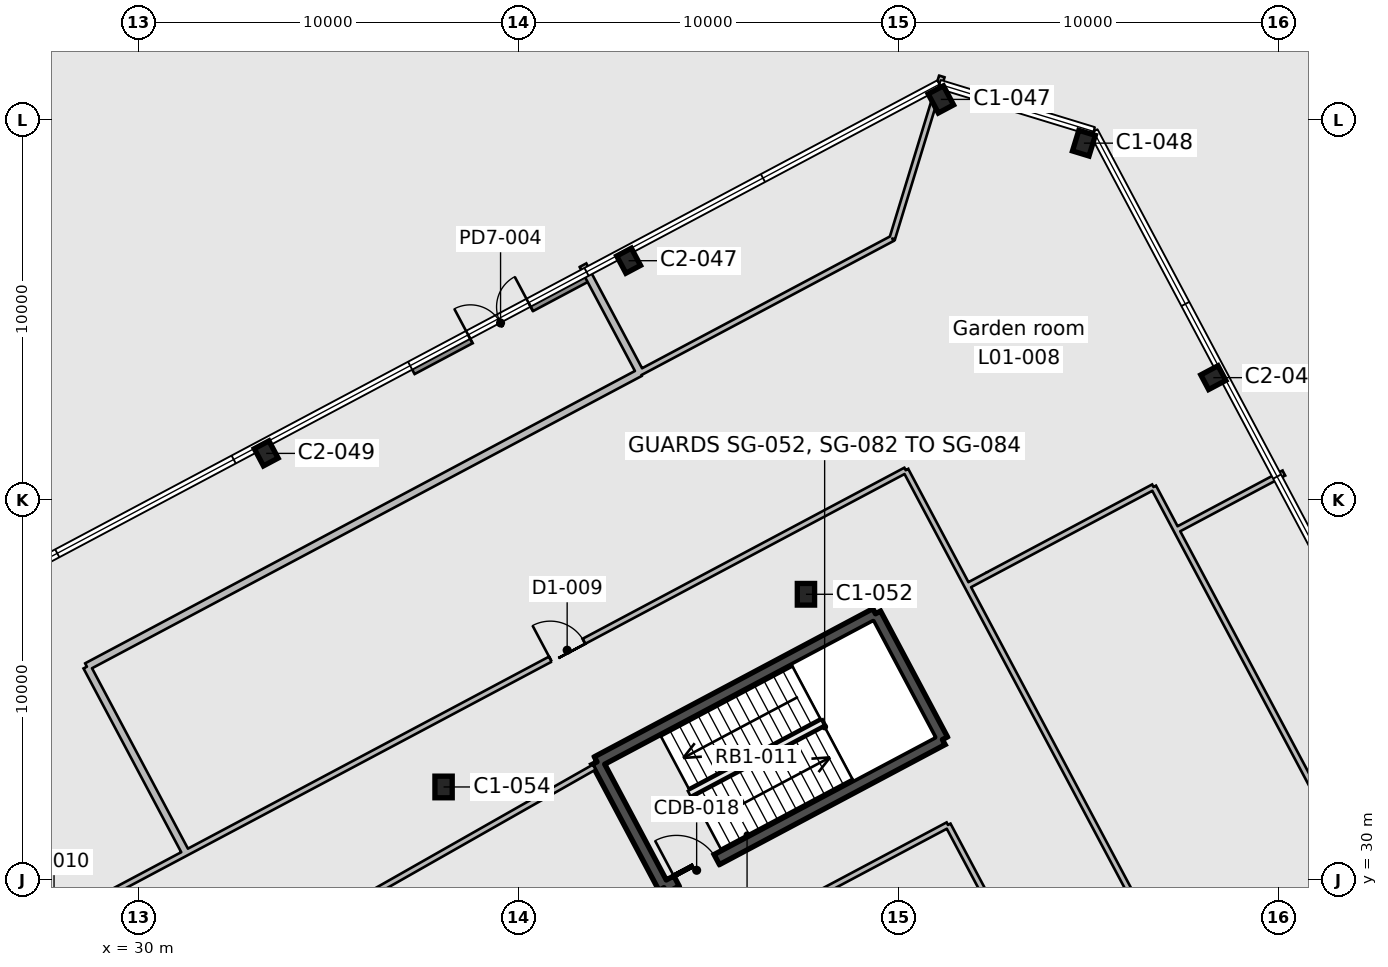
"""IFC4 building model, lengths in metres.
Left out: names, types, materials, properties, quantities, classifications, styles, units other than length and angle.
Written with IfcOpenShell. Run it as: python <this file> out.ifc"""

import sys

from ifc_helpers import new_model, si_unit, direction, frame, frame_2d, origin, origin_2d, place, context, subcontext, project, spatial, rectangle, i_section, extrude, element, fill, save


model = new_model("IFC4")
c1 = context("Model", 3, precision=1e-05, world=origin(), true_north=direction((0.0, 1.0)))
c2 = subcontext(c1, "Body", "Model", "MODEL_VIEW")
j1 = project(units=[si_unit("LENGTHUNIT", "METRE"), si_unit("PLANEANGLEUNIT", "RADIAN")], contexts=[c1])
p1 = place(None, origin())
s1 = spatial("IfcSite", under=j1, at=p1, CompositionType="ELEMENT")
p2 = place(p1, origin())
s2 = spatial("IfcBuilding", under=s1, at=p2, CompositionType="ELEMENT")
p3 = place(p2, frame((0.0, 0.0, 7.0)))
s3 = spatial("IfcBuildingStorey", under=s2, at=p3, CompositionType="ELEMENT", Elevation=7.0)
for number, where, z_axis, x_axis in (
    (1, (38.018, 32.446, 0.0), (0.0, 0.0, 1.0), (1.0, 0.0, 0.0)),
    (2, (47.553, 37.516, 0.0), (0.0, 0.0, 1.0), (1.0, 0.0, 0.0)),
):
    element("IfcColumn", number, at=place(p3, frame(where, z_axis=z_axis, x_axis=x_axis)), inside=s3, PredefinedType="COLUMN", context=c2, shape_type="SweptSolid", body=[
        extrude(i_section(OverallWidth=0.455, OverallDepth=0.569, WebThickness=0.078, FlangeThickness=0.125, FilletRadius=0.015, at=origin_2d()), origin(), (0.0, 0.0, 1.0), 5.2),
    ])
for number, where, z_axis, x_axis in (
    (3, (33.351, 41.223, 0.0), (0.0, 0.0, 1.0), (-0.883, -0.469, 0.0)),
    (4, (58.272, 43.216, 0.0), (0.0, 0.0, 1.0), (-0.469, 0.883, 0.0)),
    (5, (42.887, 46.293, 0.0), (0.0, 0.0, 1.0), (-0.883, -0.469, 0.0)),
):
    element("IfcColumn", number, at=place(p3, frame(where, z_axis=z_axis, x_axis=x_axis)), inside=s3, PredefinedType="COLUMN", context=c2, shape_type="SweptSolid", body=[
        extrude(i_section(OverallWidth=0.437, OverallDepth=0.513, WebThickness=0.061, FlangeThickness=0.097, FilletRadius=0.015, at=origin_2d()), origin(), (0.0, 0.0, 1.0), 5.2),
    ])
for number, where, z_axis, x_axis in (
    (6, (54.867, 49.386, 0.0), (0.0, 0.0, 1.0), (-0.956, 0.292, 0.0)),
    (7, (51.103, 50.537, 0.0), (0.0, 0.0, 1.0), (-0.883, -0.469, 0.0)),
):
    element("IfcColumn", number, at=place(p3, frame(where, z_axis=z_axis, x_axis=x_axis)), inside=s3, PredefinedType="COLUMN", context=c2, shape_type="SweptSolid", body=[
        extrude(i_section(OverallWidth=0.455, OverallDepth=0.569, WebThickness=0.078, FlangeThickness=0.125, FilletRadius=0.015, at=origin_2d()), origin(), (0.0, 0.0, 1.0), 5.2),
    ])
p4 = place(p3, frame((49.384, 37.004, 0.0), z_axis=(0.0, 0.0, 1.0), x_axis=(0.46946936446, -0.882948761726, 0.0)))
e8 = element("IfcWall", 8, at=p4, inside=s3, PredefinedType="SHEAR", context=c2, shape_type="SweptSolid", body=[
    extrude(rectangle(XDim=3.75, YDim=0.3, at=frame_2d((1.875, 0.0))), origin(), (0.0, 0.0, 1.0), 5.2),
])
p5 = place(p3, frame((51.145, 33.693, 0.0), z_axis=(0.0, 0.0, 1.0), x_axis=(-0.882945809314, -0.469474917132, 0.0)))
e9 = element("IfcWall", 9, at=p5, inside=s3, PredefinedType="SHEAR", context=c2, shape_type="SweptSolid", body=[
    extrude(rectangle(XDim=8.3, YDim=0.3, at=frame_2d((4.15, 0.0))), origin(), (0.0, 0.0, 1.0), 5.2),
])
p6 = place(p5, frame((6.725, 0.0, 0.0)))
e10 = element("IfcOpeningElement", 10, at=p6, cuts=e9, PredefinedType="OPENING", context=c2, shape_type="SweptSolid", body=[
    extrude(rectangle(XDim=1.2, YDim=2.1, at=frame_2d((0.6, 1.05))), frame((0.0, 0.16, 0.0), z_axis=(0.0, -1.0, 0.0), x_axis=(1.0, 0.0, 0.0)), (0.0, 0.0, 1.0), 0.32),
])
p7 = place(p3, frame((43.816, 29.796, 0.0), z_axis=(0.0, 0.0, 1.0), x_axis=(-0.46946936446, 0.882948761726, 0.0)))
e11 = element("IfcWall", 11, at=p7, inside=s3, PredefinedType="SHEAR", context=c2, shape_type="SweptSolid", body=[
    extrude(rectangle(XDim=3.75, YDim=0.3, at=frame_2d((1.875, 0.0))), origin(), (0.0, 0.0, 1.0), 5.2),
])
p8 = place(p3, frame((42.055, 33.107, 0.0), z_axis=(0.0, 0.0, 1.0), x_axis=(0.882945809314, 0.469474917132, 0.0)))
e12 = element("IfcWall", 12, at=p8, inside=s3, PredefinedType="SHEAR", context=c2, shape_type="SweptSolid", body=[
    extrude(rectangle(XDim=8.3, YDim=0.3, at=frame_2d((4.15, 0.0))), origin(), (0.0, 0.0, 1.0), 5.2),
])
p9 = place(p3, frame((41.839, 45.888, 0.0), z_axis=(0.0, 0.0, 1.0), x_axis=(-0.882946113264, -0.469474345488, 0.0)))
e13 = element("IfcWall", 13, at=p9, inside=s3, PredefinedType="STANDARD", context=c2, shape_type="SweptSolid", body=[
    extrude(rectangle(XDim=5.258, YDim=0.25, at=frame_2d((2.629, 0.0))), origin(), (0.0, 0.0, 1.0), 3.612),
])
p10 = place(p9, frame((1.729, 0.0, 0.0)))
e14 = element("IfcOpeningElement", 14, at=p10, cuts=e13, PredefinedType="OPENING", context=c2, shape_type="SweptSolid", body=[
    extrude(rectangle(XDim=1.8, YDim=2.4, at=frame_2d((0.9, 1.2))), frame((0.0, 0.135, 0.0), z_axis=(0.0, -1.0, 0.0), x_axis=(1.0, 0.0, 0.0)), (0.0, 0.0, 1.0), 0.27),
])
p11 = place(p3, frame((0.0, 14.1, 0.0), z_axis=(0.0, 0.0, 1.0), x_axis=(0.882942713919, 0.469480738623, 0.0)))
e15 = element("IfcWall", 15, at=p11, inside=s3, PredefinedType="PARTITIONING", context=c2, shape_type="SweptSolid", body=[
    extrude(rectangle(XDim=36.591, YDim=0.15, at=frame_2d((18.296, 0.0))), origin(), (0.0, 0.0, 1.0), 4.75),
])
p12 = place(p11, frame((30.95, 0.0, 0.0)))
e16 = element("IfcOpeningElement", 16, at=p12, cuts=e15, PredefinedType="OPENING", context=c2, shape_type="SweptSolid", body=[
    extrude(rectangle(XDim=1.0, YDim=2.1, at=frame_2d((0.5, 1.05))), frame((0.0, 0.085, 0.0), z_axis=(0.0, -1.0, 0.0), x_axis=(1.0, 0.0, 0.0)), (0.0, 0.0, 1.0), 0.17),
])
p13 = place(p11, frame((20.45, 0.0, 0.0)))
e17 = element("IfcOpeningElement", 17, at=p13, cuts=e15, PredefinedType="OPENING", context=c2, shape_type="SweptSolid", body=[
    extrude(rectangle(XDim=1.0, YDim=2.1, at=frame_2d((0.5, 1.05))), frame((0.0, 0.085, 0.0), z_axis=(0.0, -1.0, 0.0), x_axis=(1.0, 0.0, 0.0)), (0.0, 0.0, 1.0), 0.17),
])
p14 = place(p11, frame((17.75, 0.0, 0.0)))
e18 = element("IfcOpeningElement", 18, at=p14, cuts=e15, PredefinedType="OPENING", context=c2, shape_type="SweptSolid", body=[
    extrude(rectangle(XDim=1.0, YDim=2.1, at=frame_2d((0.5, 1.05))), frame((0.0, 0.085, 0.0), z_axis=(0.0, -1.0, 0.0), x_axis=(1.0, 0.0, 0.0)), (0.0, 0.0, 1.0), 0.17),
])
p15 = place(p3, frame((31.23, 30.726, 0.0), z_axis=(0.0, 0.0, 1.0), x_axis=(-0.469403649121, 0.882983699845, 0.0)))
e19 = element("IfcWall", 19, at=p15, inside=s3, PredefinedType="PARTITIONING", context=c2, shape_type="SweptSolid", body=[
    extrude(rectangle(XDim=5.532, YDim=0.2, at=frame_2d((2.766, 0.0))), origin(), (0.0, 0.0, 1.0), 4.75),
])
p16 = place(p3, frame((28.633, 35.611, 0.0), z_axis=(0.0, 0.0, 1.0), x_axis=(0.882947109015, 0.469472472762, 0.0)))
e20 = element("IfcWall", 20, at=p16, inside=s3, PredefinedType="PARTITIONING", context=c2, shape_type="SweptSolid", body=[
    extrude(rectangle(XDim=16.484, YDim=0.2, at=frame_2d((8.242, 0.0))), origin(), (0.0, 0.0, 1.0), 4.75),
])
p17 = place(p3, frame((32.308, 31.279, 0.0), z_axis=(0.0, 0.0, 1.0), x_axis=(0.882939951573, 0.469485933673, 0.0)))
e21 = element("IfcWall", 21, at=p17, inside=s3, PredefinedType="PARTITIONING", context=c2, shape_type="SweptSolid", body=[
    extrude(rectangle(XDim=20.239, YDim=0.15, at=frame_2d((10.12, 0.0))), origin(), (0.0, 0.0, 1.0), 4.75),
])
p18 = place(p17, frame((9.65, 0.0, 0.0)))
e22 = element("IfcOpeningElement", 22, at=p18, cuts=e21, PredefinedType="OPENING", context=c2, shape_type="SweptSolid", body=[
    extrude(rectangle(XDim=1.0, YDim=2.1, at=frame_2d((0.5, 1.05))), frame((0.0, 0.085, 0.0), z_axis=(0.0, -1.0, 0.0), x_axis=(1.0, 0.0, 0.0)), (0.0, 0.0, 1.0), 0.17),
])
p19 = place(p3, frame((50.178, 40.781, 0.0), z_axis=(0.0, 0.0, 1.0), x_axis=(0.469355564401, -0.883009260521, 0.0)))
e23 = element("IfcWall", 23, at=p19, inside=s3, PredefinedType="PARTITIONING", context=c2, shape_type="SweptSolid", body=[
    extrude(rectangle(XDim=3.445, YDim=0.15, at=frame_2d((1.723, 0.0))), origin(), (0.0, 0.0, 1.0), 4.75),
])
p20 = place(p3, frame((31.069, 26.77, 0.0), z_axis=(0.0, 0.0, 1.0), x_axis=(0.86954617394, 0.493851649168, 0.0)))
e24 = element("IfcWall", 24, at=p20, inside=s3, PredefinedType="PARTITIONING", context=c2, shape_type="SweptSolid", body=[
    extrude(rectangle(XDim=12.55, YDim=0.15, at=frame_2d((6.275, 0.0))), origin(), (0.0, 0.0, 1.0), 4.75),
])
p21 = place(p3, frame((41.686, 46.175, 0.0), z_axis=(0.0, 0.0, 1.0), x_axis=(0.469447181805, -0.882960556025, 0.0)))
e25 = element("IfcWall", 25, at=p21, inside=s3, PredefinedType="PARTITIONING", context=c2, shape_type="SweptSolid", body=[
    extrude(rectangle(XDim=3.199, YDim=0.2, at=frame_2d((1.6, 0.0))), origin(), (0.0, 0.0, 1.0), 4.75),
])
p22 = place(p3, frame((43.188, 43.35, 0.0), z_axis=(0.0, 0.0, 1.0), x_axis=(0.882979828545, 0.469410931256, 0.0)))
e26 = element("IfcWall", 26, at=p22, inside=s3, PredefinedType="PARTITIONING", context=c2, shape_type="SweptSolid", body=[
    extrude(rectangle(XDim=7.515, YDim=0.15, at=frame_2d((3.758, 0.0))), origin(), (0.0, 0.0, 1.0), 4.75),
])
p23 = place(p3, frame((49.824, 46.878, 0.0), z_axis=(0.0, 0.0, 1.0), x_axis=(0.29242717897, 0.956287794024, 0.0)))
e27 = element("IfcWall", 27, at=p23, inside=s3, PredefinedType="PARTITIONING", context=c2, shape_type="SweptSolid", body=[
    extrude(rectangle(XDim=4.459, YDim=0.15, at=frame_2d((2.229, 0.0))), origin(), (0.0, 0.0, 1.0), 4.75),
])
p24 = place(p3, frame((46.434, 28.866, 0.0), z_axis=(0.0, 0.0, 1.0), x_axis=(0.882942083458, 0.469481924316, 0.0)))
e28 = element("IfcWall", 28, at=p24, inside=s3, PredefinedType="PARTITIONING", context=c2, shape_type="SweptSolid", body=[
    extrude(rectangle(XDim=5.5, YDim=0.15, at=frame_2d((2.75, 0.0))), origin(), (0.0, 0.0, 1.0), 4.75),
])
p25 = place(p3, frame((51.29, 31.448, 0.0), z_axis=(0.0, 0.0, 1.0), x_axis=(0.469459757109, -0.882953869947, 0.0)))
e29 = element("IfcWall", 29, at=p25, inside=s3, PredefinedType="PARTITIONING", context=c2, shape_type="SweptSolid", body=[
    extrude(rectangle(XDim=12.738, YDim=0.15, at=frame_2d((6.369, 0.0))), origin(), (0.0, 0.0, 1.0), 4.75),
])
p26 = place(p3, frame((51.795, 37.739, 0.0), z_axis=(0.0, 0.0, 1.0), x_axis=(0.469473160434, -0.882946743373, 0.0)))
e30 = element("IfcWall", 30, at=p26, inside=s3, PredefinedType="PARTITIONING", context=c2, shape_type="SweptSolid", body=[
    extrude(rectangle(XDim=1.216, YDim=0.15, at=frame_2d((0.608, 0.0))), origin(), (0.0, 0.0, 1.0), 4.75),
])
p27 = place(p3, frame((52.351, 38.029, 0.0), z_axis=(0.0, 0.0, 1.0), x_axis=(0.882969925021, 0.469429559688, 0.0)))
e31 = element("IfcWall", 31, at=p27, inside=s3, PredefinedType="PARTITIONING", context=c2, shape_type="SweptSolid", body=[
    extrude(rectangle(XDim=4.923, YDim=0.15, at=frame_2d((2.461, 0.0))), origin(), (0.0, 0.0, 1.0), 4.75),
])
p28 = place(p3, frame((56.698, 40.34, 0.0), z_axis=(0.0, 0.0, 1.0), x_axis=(0.468946315527, -0.883226671446, 0.0)))
e32 = element("IfcWall", 32, at=p28, inside=s3, PredefinedType="PARTITIONING", context=c2, shape_type="SweptSolid", body=[
    extrude(rectangle(XDim=1.282, YDim=0.15, at=frame_2d((0.641, 0.0))), origin(), (0.0, 0.0, 1.0), 4.75),
])
p29 = place(p3, frame((51.798, 37.734, 0.0), z_axis=(0.0, 0.0, 1.0), x_axis=(0.882191163795, 0.470891442396, 0.0)))
e33 = element("IfcWall", 33, at=p29, inside=s3, PredefinedType="PARTITIONING", context=c2, shape_type="SweptSolid", body=[
    extrude(rectangle(XDim=0.627, YDim=0.15, at=frame_2d((0.313, 0.0))), origin(), (0.0, 0.0, 1.0), 4.75),
])
p30 = place(p3, frame((52.366, 36.665, 0.0), z_axis=(0.0, 0.0, 1.0), x_axis=(0.469480933333, -0.882942610387, 0.0)))
e34 = element("IfcWall", 34, at=p30, inside=s3, PredefinedType="PARTITIONING", context=c2, shape_type="SweptSolid", body=[
    extrude(rectangle(XDim=20.239, YDim=0.15, at=frame_2d((10.12, 0.0))), origin(), (0.0, 0.0, 1.0), 4.75),
])
p31 = place(p30, frame((9.65, 0.0, 0.0)))
e35 = element("IfcOpeningElement", 35, at=p31, cuts=e34, PredefinedType="OPENING", context=c2, shape_type="SweptSolid", body=[
    extrude(rectangle(XDim=1.0, YDim=2.1, at=frame_2d((0.5, 1.05))), frame((0.0, 0.085, 0.0), z_axis=(0.0, -1.0, 0.0), x_axis=(1.0, 0.0, 0.0)), (0.0, 0.0, 1.0), 0.17),
])
p32 = place(p3, frame((57.299, 39.208, 0.0), z_axis=(0.0, 0.0, 1.0), x_axis=(0.469480728433, -0.882942719337, 0.0)))
e36 = element("IfcWall", 36, at=p32, inside=s3, PredefinedType="PARTITIONING", context=c2, shape_type="SweptSolid", body=[
    extrude(rectangle(XDim=28.934, YDim=0.15, at=frame_2d((14.467, 0.0))), origin(), (0.0, 0.0, 1.0), 4.75),
])
p33 = place(p3, frame((60.127, 40.707, 0.0), z_axis=(0.0, 0.0, 1.0), x_axis=(-0.883027796121, -0.469320691295, 0.0)))
e37 = element("IfcWall", 37, at=p33, inside=s3, PredefinedType="PARTITIONING", context=c2, shape_type="SweptSolid", body=[
    extrude(rectangle(XDim=3.2, YDim=0.15, at=frame_2d((1.6, 0.0))), origin(), (0.0, 0.0, 1.0), 4.75),
])
p34 = place(p6, frame((1.2, 0.0, 0.0), z_axis=(0.0, 0.0, 1.0), x_axis=(-1.0, 0.0, 0.0)))
e38 = element("IfcDoor", 38, at=p34, inside=s3, OperationType="SINGLE_SWING_LEFT", PredefinedType="DOOR", context=c2, shape_type="SweptSolid", body=[
    extrude(rectangle(XDim=1.2, YDim=2.1, at=frame_2d((0.6, 1.05))), frame((0.0, 0.025, 0.0), z_axis=(0.0, -1.0, 0.0), x_axis=(1.0, 0.0, 0.0)), (0.0, 0.0, 1.0), 0.05),
])
fill(e10, e38)
p35 = place(p10, frame((1.8, 0.0, 0.0), z_axis=(0.0, 0.0, 1.0), x_axis=(-1.0, 0.0, 0.0)))
e39 = element("IfcDoor", 39, at=p35, inside=s3, OperationType="DOUBLE_DOOR_SINGLE_SWING", PredefinedType="DOOR", context=c2, shape_type="SweptSolid", body=[
    extrude(rectangle(XDim=1.8, YDim=2.4, at=frame_2d((0.9, 1.2))), frame((0.0, 0.025, 0.0), z_axis=(0.0, -1.0, 0.0), x_axis=(1.0, 0.0, 0.0)), (0.0, 0.0, 1.0), 0.05),
])
fill(e14, e39)
p36 = place(p18, origin())
e40 = element("IfcDoor", 40, at=p36, inside=s3, OperationType="SINGLE_SWING_LEFT", PredefinedType="DOOR", context=c2, shape_type="SweptSolid", body=[
    extrude(rectangle(XDim=1.0, YDim=2.1, at=frame_2d((0.5, 1.05))), frame((0.0, 0.025, 0.0), z_axis=(0.0, -1.0, 0.0), x_axis=(1.0, 0.0, 0.0)), (0.0, 0.0, 1.0), 0.05),
])
fill(e22, e40)
save(model, sys.argv[1])
